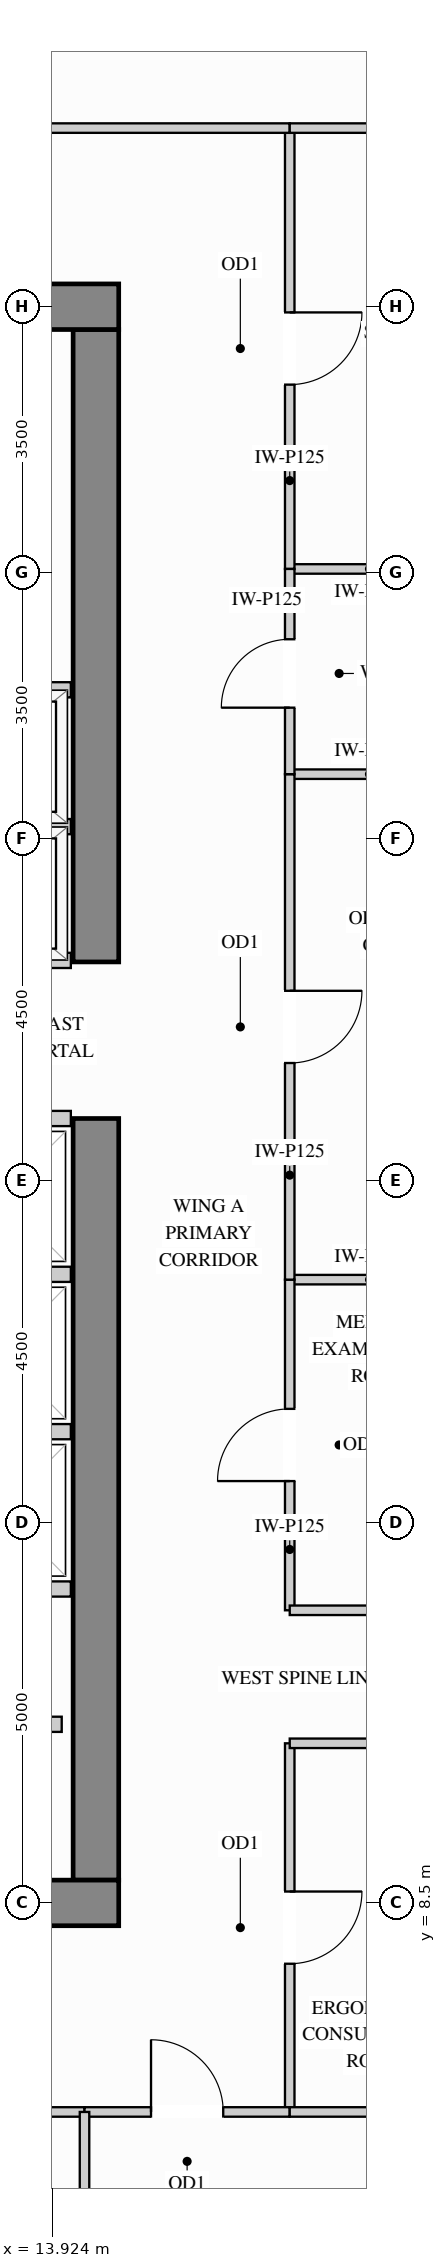
"""IFC4 building model, lengths in metres.
Left out: names, types, materials, properties, quantities, classifications, styles, units other than length and angle.
Written with IfcOpenShell. Run it as: python <this file> out.ifc"""

import sys

from ifc_helpers import new_model, si_unit, direction, frame, frame_2d, origin, place, context, subcontext, project, spatial, rectangle, extrude, source, transform, mapped, element, fill, save


model = new_model("IFC4")
c1 = context("Model", 3, precision=1e-05, world=origin(), true_north=direction((0.0, 1.0)))
c2 = subcontext(c1, "Body", "Model", "MODEL_VIEW")
j1 = project(units=[si_unit("LENGTHUNIT", "METRE"), si_unit("PLANEANGLEUNIT", "RADIAN")], contexts=[c1])
p1 = place(None, origin())
s1 = spatial("IfcSite", under=j1, at=p1, CompositionType="ELEMENT")
p2 = place(p1, origin())
s2 = spatial("IfcBuilding", under=s1, at=p2, CompositionType="ELEMENT")
p3 = place(p2, frame((0.0, 0.0, 157.5)))
s3 = spatial("IfcBuildingStorey", under=s2, at=p3, CompositionType="ELEMENT", Elevation=157.5)
m1 = source(origin(), c2, "Body", "SweptSolid", [
    extrude(rectangle(XDim=10.02, YDim=0.6, at=frame_2d((5.01, 0.0))), origin(), (0.0, 0.0, 1.0), 3.4),
])
p4 = place(p3, frame((14.5, 8.8, 0.0), z_axis=(0.0, 0.0, 1.0), x_axis=(0.0, 1.0, 0.0)))
e1 = element("IfcWall", 1, at=p4, inside=s3, PredefinedType="SHEAR", context=c2, shape_type="MappedRepresentation", body=[
    mapped(m1, transform((0.0, 0.0, 0.0), x_axis=(1.0, 0.0, 0.0), y_axis=(0.0, 1.0, 0.0), z_axis=(0.0, 0.0, 1.0))),
])
m2 = source(origin(), c2, "Body", "SweptSolid", [
    extrude(rectangle(XDim=8.32, YDim=0.6, at=frame_2d((4.16, 0.0))), origin(), (0.0, 0.0, 1.0), 3.4),
])
p5 = place(p3, frame((14.5, 20.88, 0.0), z_axis=(0.0, 0.0, 1.0), x_axis=(0.0, 1.0, 0.0)))
e2 = element("IfcWall", 2, at=p5, inside=s3, PredefinedType="SHEAR", context=c2, shape_type="MappedRepresentation", body=[
    mapped(m2, transform((0.0, 0.0, 0.0), x_axis=(1.0, 0.0, 0.0), y_axis=(0.0, 1.0, 0.0), z_axis=(0.0, 0.0, 1.0))),
])
m3 = source(origin(), c2, "Body", "SweptSolid", [
    extrude(rectangle(XDim=10.6, YDim=0.6, at=frame_2d((5.3, 0.0))), origin(), (0.0, 0.0, 1.0), 3.4),
])
for number, where, z_axis, x_axis in (
    (3, (4.2, 29.5, 0.0), (0.0, 0.0, 1.0), (1.0, 0.0, 0.0)),
    (4, (4.2, 8.5, 0.0), (0.0, 0.0, 1.0), (1.0, 0.0, 0.0)),
):
    element("IfcWall", number, at=place(p3, frame(where, z_axis=z_axis, x_axis=x_axis)), inside=s3, PredefinedType="SHEAR", context=c2, shape_type="MappedRepresentation", body=[
        mapped(m3, transform((0.0, 0.0, 0.0), x_axis=(1.0, 0.0, 0.0), y_axis=(0.0, 1.0, 0.0), z_axis=(0.0, 0.0, 1.0))),
    ])
m4 = source(origin(), c2, "Body", "SweptSolid", [
    extrude(rectangle(XDim=2.1, YDim=0.125, at=frame_2d((1.05, 0.0))), origin(), (0.0, 0.0, 1.0), 2.916),
])
p6 = place(p3, frame((17.05, 16.7, 0.0), z_axis=(0.0, 0.0, 1.0), x_axis=(1.0, 0.0, 0.0)))
e5 = element("IfcWall", 5, at=p6, inside=s3, PredefinedType="PARTITIONING", context=c2, shape_type="MappedRepresentation", body=[
    mapped(m4, transform((0.0, 0.0, 0.0), x_axis=(1.0, 0.0, 0.0), y_axis=(0.0, 1.0, 0.0), z_axis=(0.0, 0.0, 1.0))),
])
m5 = source(origin(), c2, "Body", "SweptSolid", [
    extrude(rectangle(XDim=2.098, YDim=0.125, at=frame_2d((1.049, 0.0))), origin(), (0.0, 0.0, 1.0), 3.385),
])
for number, where, z_axis, x_axis in (
    (6, (17.05, 23.35, 0.0), (0.0, 0.0, 1.0), (1.0, 0.0, 0.0)),
    (7, (17.05, 26.05, 0.0), (0.0, 0.0, 1.0), (1.0, 0.0, 0.0)),
):
    element("IfcWall", number, at=place(p3, frame(where, z_axis=z_axis, x_axis=x_axis)), inside=s3, PredefinedType="PARTITIONING", context=c2, shape_type="MappedRepresentation", body=[
        mapped(m5, transform((0.0, 0.0, 0.0), x_axis=(1.0, 0.0, 0.0), y_axis=(0.0, 1.0, 0.0), z_axis=(0.0, 0.0, 1.0))),
    ])
p7 = place(p3, frame((17.05, 12.35, 0.0), z_axis=(0.0, 0.0, 1.0), x_axis=(0.0, 1.0, 0.0)))
e8 = element("IfcWall", 8, at=p7, inside=s3, PredefinedType="PARTITIONING", context=c2, shape_type="SweptSolid", body=[
    extrude(rectangle(XDim=4.35, YDim=0.125, at=frame_2d((2.175, 0.0))), origin(), (0.0, 0.0, 1.0), 3.385),
])
p8 = place(p7, frame((1.7, 0.0, 0.0)))
e9 = element("IfcOpeningElement", 9, at=p8, cuts=e8, PredefinedType="OPENING", context=c2, shape_type="SweptSolid", body=[
    extrude(rectangle(XDim=0.95, YDim=2.15, at=frame_2d((0.475, 1.075))), frame((0.0, 0.073, 0.0), z_axis=(0.0, -1.0, 0.0), x_axis=(1.0, 0.0, 0.0)), (0.0, 0.0, 1.0), 0.145),
])
p9 = place(p3, frame((17.05, 16.7, 0.0), z_axis=(0.0, 0.0, 1.0), x_axis=(0.0, 1.0, 0.0)))
e10 = element("IfcWall", 10, at=p9, inside=s3, PredefinedType="PARTITIONING", context=c2, shape_type="SweptSolid", body=[
    extrude(rectangle(XDim=6.65, YDim=0.125, at=frame_2d((3.325, 0.0))), origin(), (0.0, 0.0, 1.0), 3.385),
])
p10 = place(p9, frame((2.85, 0.0, 0.0)))
e11 = element("IfcOpeningElement", 11, at=p10, cuts=e10, PredefinedType="OPENING", context=c2, shape_type="SweptSolid", body=[
    extrude(rectangle(XDim=0.95, YDim=2.15, at=frame_2d((0.475, 1.075))), frame((0.0, 0.073, 0.0), z_axis=(0.0, -1.0, 0.0), x_axis=(1.0, 0.0, 0.0)), (0.0, 0.0, 1.0), 0.145),
])
p11 = place(p3, frame((17.05, 26.05, 0.0), z_axis=(0.0, 0.0, 1.0), x_axis=(0.0, 1.0, 0.0)))
e12 = element("IfcWall", 12, at=p11, inside=s3, PredefinedType="PARTITIONING", context=c2, shape_type="SweptSolid", body=[
    extrude(rectangle(XDim=5.8, YDim=0.125, at=frame_2d((2.9, 0.0))), origin(), (0.0, 0.0, 1.0), 3.385),
])
p12 = place(p11, frame((2.425, 0.0, 0.0)))
e13 = element("IfcOpeningElement", 13, at=p12, cuts=e12, PredefinedType="OPENING", context=c2, shape_type="SweptSolid", body=[
    extrude(rectangle(XDim=0.95, YDim=2.15, at=frame_2d((0.475, 1.075))), frame((0.0, 0.073, 0.0), z_axis=(0.0, -1.0, 0.0), x_axis=(1.0, 0.0, 0.0)), (0.0, 0.0, 1.0), 0.145),
])
p13 = place(p3, frame((17.05, 5.75, 0.0), z_axis=(0.0, 0.0, 1.0), x_axis=(0.0, 1.0, 0.0)))
e14 = element("IfcWall", 14, at=p13, inside=s3, PredefinedType="PARTITIONING", context=c2, shape_type="SweptSolid", body=[
    extrude(rectangle(XDim=4.85, YDim=0.125, at=frame_2d((2.425, 0.0))), origin(), (0.0, 0.0, 1.0), 3.385),
])
p14 = place(p13, frame((1.95, 0.0, 0.0)))
e15 = element("IfcOpeningElement", 15, at=p14, cuts=e14, PredefinedType="OPENING", context=c2, shape_type="SweptSolid", body=[
    extrude(rectangle(XDim=0.95, YDim=2.15, at=frame_2d((0.475, 1.075))), frame((0.0, 0.073, 0.0), z_axis=(0.0, -1.0, 0.0), x_axis=(1.0, 0.0, 0.0)), (0.0, 0.0, 1.0), 0.145),
])
p15 = place(p3, frame((17.05, 23.35, 0.0), z_axis=(0.0, 0.0, 1.0), x_axis=(0.0, 1.0, 0.0)))
e16 = element("IfcWall", 16, at=p15, inside=s3, PredefinedType="PARTITIONING", context=c2, shape_type="SweptSolid", body=[
    extrude(rectangle(XDim=2.7, YDim=0.125, at=frame_2d((1.35, 0.0))), origin(), (0.0, 0.0, 1.0), 3.385),
])
p16 = place(p15, frame((0.875, 0.0, 0.0)))
e17 = element("IfcOpeningElement", 17, at=p16, cuts=e16, PredefinedType="OPENING", context=c2, shape_type="SweptSolid", body=[
    extrude(rectangle(XDim=0.9, YDim=2.15, at=frame_2d((0.45, 1.075))), frame((0.0, 0.073, 0.0), z_axis=(0.0, -1.0, 0.0), x_axis=(1.0, 0.0, 0.0)), (0.0, 0.0, 1.0), 0.145),
])
p17 = place(p3, frame((9.039, 31.85, 0.0), z_axis=(0.0, 0.0, 1.0), x_axis=(1.0, 0.0, 0.0)))
e18 = element("IfcWall", 18, at=p17, inside=s3, PredefinedType="PARTITIONING", context=c2, shape_type="SweptSolid", body=[
    extrude(rectangle(XDim=8.011, YDim=0.125, at=frame_2d((4.005, 0.0))), origin(), (0.0, 0.0, 1.0), 2.848),
])
p18 = place(p17, frame((3.531, 0.0, 0.0)))
e19 = element("IfcOpeningElement", 19, at=p18, cuts=e18, PredefinedType="OPENING", context=c2, shape_type="SweptSolid", body=[
    extrude(rectangle(XDim=0.95, YDim=2.15, at=frame_2d((0.475, 1.075))), frame((0.0, 0.073, 0.0), z_axis=(0.0, -1.0, 0.0), x_axis=(1.0, 0.0, 0.0)), (0.0, 0.0, 1.0), 0.145),
])
m6 = source(origin(), c2, "Body", "SweptSolid", [
    extrude(rectangle(XDim=2.098, YDim=0.125, at=frame_2d((1.049, 0.0))), origin(), (0.0, 0.0, 1.0), 2.848),
])
p19 = place(p3, frame((17.05, 31.85, 0.0), z_axis=(0.0, 0.0, 1.0), x_axis=(1.0, 0.0, 0.0)))
e20 = element("IfcWall", 20, at=p19, inside=s3, PredefinedType="PARTITIONING", context=c2, shape_type="MappedRepresentation", body=[
    mapped(m6, transform((0.0, 0.0, 0.0), x_axis=(1.0, 0.0, 0.0), y_axis=(0.0, 1.0, 0.0), z_axis=(0.0, 0.0, 1.0))),
])
m7 = source(origin(), c2, "Body", "SweptSolid", [
    extrude(rectangle(XDim=2.45, YDim=0.125, at=frame_2d((1.225, 0.0))), origin(), (0.0, 0.0, 1.0), 3.385),
])
for number, where, z_axis, x_axis in (
    (21, (17.05, 12.35, 0.0), (0.0, 0.0, 1.0), (1.0, 0.0, 0.0)),
    (22, (17.05, 10.6, 0.0), (0.0, 0.0, 1.0), (1.0, 0.0, 0.0)),
):
    element("IfcWall", number, at=place(p3, frame(where, z_axis=z_axis, x_axis=x_axis)), inside=s3, PredefinedType="PARTITIONING", context=c2, shape_type="MappedRepresentation", body=[
        mapped(m7, transform((0.0, 0.0, 0.0), x_axis=(1.0, 0.0, 0.0), y_axis=(0.0, 1.0, 0.0), z_axis=(0.0, 0.0, 1.0))),
    ])
p20 = place(p3, frame((8.558, 5.75, 0.0), z_axis=(0.0, 0.0, 1.0), x_axis=(1.0, 0.0, 0.0)))
e23 = element("IfcWall", 23, at=p20, inside=s3, PredefinedType="PARTITIONING", context=c2, shape_type="SweptSolid", body=[
    extrude(rectangle(XDim=5.792, YDim=0.125, at=frame_2d((2.896, 0.0))), origin(), (0.0, 0.0, 1.0), 3.385),
])
p21 = place(p20, frame((2.421, 0.0, 0.0)))
e24 = element("IfcOpeningElement", 24, at=p21, cuts=e23, PredefinedType="OPENING", context=c2, shape_type="SweptSolid", body=[
    extrude(rectangle(XDim=0.95, YDim=2.15, at=frame_2d((0.475, 1.075))), frame((0.0, 0.073, 0.0), z_axis=(0.0, -1.0, 0.0), x_axis=(1.0, 0.0, 0.0)), (0.0, 0.0, 1.0), 0.145),
])
p22 = place(p3, frame((14.35, 5.75, 0.0), z_axis=(0.0, 0.0, 1.0), x_axis=(1.0, 0.0, 0.0)))
e25 = element("IfcWall", 25, at=p22, inside=s3, PredefinedType="PARTITIONING", context=c2, shape_type="SweptSolid", body=[
    extrude(rectangle(XDim=2.7, YDim=0.125, at=frame_2d((1.35, 0.0))), origin(), (0.0, 0.0, 1.0), 3.385),
])
p23 = place(p22, frame((0.875, 0.0, 0.0)))
e26 = element("IfcOpeningElement", 26, at=p23, cuts=e25, PredefinedType="OPENING", context=c2, shape_type="SweptSolid", body=[
    extrude(rectangle(XDim=0.95, YDim=2.15, at=frame_2d((0.475, 1.075))), frame((0.0, 0.073, 0.0), z_axis=(0.0, -1.0, 0.0), x_axis=(1.0, 0.0, 0.0)), (0.0, 0.0, 1.0), 0.145),
])
p24 = place(p3, frame((17.05, 5.75, 0.0), z_axis=(0.0, 0.0, 1.0), x_axis=(1.0, 0.0, 0.0)))
e27 = element("IfcWall", 27, at=p24, inside=s3, PredefinedType="PARTITIONING", context=c2, shape_type="MappedRepresentation", body=[
    mapped(m5, transform((0.0, 0.0, 0.0), x_axis=(1.0, 0.0, 0.0), y_axis=(0.0, 1.0, 0.0), z_axis=(0.0, 0.0, 1.0))),
])
m8 = source(origin(), c2, "Body", "SweptSolid", [
    extrude(rectangle(XDim=4.63, YDim=0.125, at=frame_2d((2.315, 0.0))), origin(), (0.0, 0.0, 1.0), 3.385),
])
p25 = place(p3, frame((14.35, 1.12, 0.0), z_axis=(0.0, 0.0, 1.0), x_axis=(0.0, 1.0, 0.0)))
e28 = element("IfcWall", 28, at=p25, inside=s3, PredefinedType="PARTITIONING", context=c2, shape_type="MappedRepresentation", body=[
    mapped(m8, transform((0.0, 0.0, 0.0), x_axis=(1.0, 0.0, 0.0), y_axis=(0.0, 1.0, 0.0), z_axis=(0.0, 0.0, 1.0))),
])
m9 = source(origin(), c2, "Body", "SweptSolid", [
    extrude(rectangle(XDim=1.63, YDim=0.2, at=frame_2d((0.815, 0.0))), origin(), (0.0, 0.0, 1.0), 3.385),
])
p26 = place(p3, frame((12.42, 10.85, 0.0), z_axis=(0.0, 0.0, 1.0), x_axis=(1.0, 0.0, 0.0)))
e29 = element("IfcWall", 29, at=p26, inside=s3, PredefinedType="PARTITIONING", context=c2, shape_type="MappedRepresentation", body=[
    mapped(m9, transform((0.0, 0.0, 0.0), x_axis=(1.0, 0.0, 0.0), y_axis=(0.0, 1.0, 0.0), z_axis=(0.0, 0.0, 1.0))),
])
m10 = source(origin(), c2, "Body", "SweptSolid", [
    extrude(rectangle(XDim=2.34, YDim=0.2, at=frame_2d((1.17, 0.0))), origin(), (0.0, 0.0, 1.0), 3.385),
])
for number, where, z_axis, x_axis in (
    (30, (11.83, 22.66, 0.0), (0.0, 0.0, 1.0), (1.0, 0.0, 0.0)),
    (31, (11.83, 20.9, 0.0), (0.0, 0.0, 1.0), (1.0, 0.0, 0.0)),
    (32, (11.83, 24.46, 0.0), (0.0, 0.0, 1.0), (1.0, 0.0, 0.0)),
):
    element("IfcWall", number, at=place(p3, frame(where, z_axis=z_axis, x_axis=x_axis)), inside=s3, PredefinedType="PARTITIONING", context=c2, shape_type="MappedRepresentation", body=[
        mapped(m10, transform((0.0, 0.0, 0.0), x_axis=(1.0, 0.0, 0.0), y_axis=(0.0, 1.0, 0.0), z_axis=(0.0, 0.0, 1.0))),
    ])
m11 = source(origin(), c2, "Body", "SweptSolid", [
    extrude(rectangle(XDim=1.94, YDim=0.2, at=frame_2d((0.97, 0.0))), origin(), (0.0, 0.0, 1.0), 3.385),
])
for number, where, z_axis, x_axis in (
    (33, (12.23, 14.7, 0.0), (0.0, 0.0, 1.0), (1.0, 0.0, 0.0)),
    (34, (12.23, 12.63, 0.0), (0.0, 0.0, 1.0), (1.0, 0.0, 0.0)),
    (35, (12.23, 16.77, 0.0), (0.0, 0.0, 1.0), (1.0, 0.0, 0.0)),
    (36, (12.23, 18.82, 0.0), (0.0, 0.0, 1.0), (1.0, 0.0, 0.0)),
):
    element("IfcWall", number, at=place(p3, frame(where, z_axis=z_axis, x_axis=x_axis)), inside=s3, PredefinedType="PARTITIONING", context=c2, shape_type="MappedRepresentation", body=[
        mapped(m11, transform((0.0, 0.0, 0.0), x_axis=(1.0, 0.0, 0.0), y_axis=(0.0, 1.0, 0.0), z_axis=(0.0, 0.0, 1.0))),
    ])
m12 = source(origin(), c2, "Body", "SweptSolid", [
    extrude(rectangle(XDim=0.95, YDim=2.15, at=frame_2d((0.475, 1.075))), frame((0.0, 0.025, 0.0), z_axis=(0.0, -1.0, 0.0), x_axis=(1.0, 0.0, 0.0)), (0.0, 0.0, 1.0), 0.05),
])
p27 = place(p14, origin())
e37 = element("IfcDoor", 37, at=p27, inside=s3, OperationType="SINGLE_SWING_RIGHT", PredefinedType="DOOR", context=c2, shape_type="MappedRepresentation", body=[
    mapped(m12, transform((0.0, 0.0, 0.0), x_axis=(1.0, 0.0, 0.0), y_axis=(0.0, 1.0, 0.0), z_axis=(0.0, 0.0, 1.0))),
])
fill(e15, e37)
p28 = place(p8, origin())
e38 = element("IfcDoor", 38, at=p28, inside=s3, OperationType="SINGLE_SWING_LEFT", PredefinedType="DOOR", context=c2, shape_type="MappedRepresentation", body=[
    mapped(m12, transform((0.0, 0.0, 0.0), x_axis=(1.0, 0.0, 0.0), y_axis=(0.0, 1.0, 0.0), z_axis=(0.0, 0.0, 1.0))),
])
fill(e9, e38)
p29 = place(p10, origin())
e39 = element("IfcDoor", 39, at=p29, inside=s3, OperationType="SINGLE_SWING_RIGHT", PredefinedType="DOOR", context=c2, shape_type="MappedRepresentation", body=[
    mapped(m12, transform((0.0, 0.0, 0.0), x_axis=(1.0, 0.0, 0.0), y_axis=(0.0, 1.0, 0.0), z_axis=(0.0, 0.0, 1.0))),
])
fill(e11, e39)
p30 = place(p12, origin())
e40 = element("IfcDoor", 40, at=p30, inside=s3, OperationType="SINGLE_SWING_RIGHT", PredefinedType="DOOR", context=c2, shape_type="MappedRepresentation", body=[
    mapped(m12, transform((0.0, 0.0, 0.0), x_axis=(1.0, 0.0, 0.0), y_axis=(0.0, 1.0, 0.0), z_axis=(0.0, 0.0, 1.0))),
])
fill(e13, e40)
p31 = place(p23, origin())
e41 = element("IfcDoor", 41, at=p31, inside=s3, OperationType="SINGLE_SWING_LEFT", PredefinedType="DOOR", context=c2, shape_type="MappedRepresentation", body=[
    mapped(m12, transform((0.0, 0.0, 0.0), x_axis=(1.0, 0.0, 0.0), y_axis=(0.0, 1.0, 0.0), z_axis=(0.0, 0.0, 1.0))),
])
fill(e26, e41)
m13 = source(origin(), c2, "Body", "SweptSolid", [
    extrude(rectangle(XDim=0.9, YDim=2.15, at=frame_2d((0.45, 1.075))), frame((0.0, 0.025, 0.0), z_axis=(0.0, -1.0, 0.0), x_axis=(1.0, 0.0, 0.0)), (0.0, 0.0, 1.0), 0.05),
])
p32 = place(p16, origin())
e42 = element("IfcDoor", 42, at=p32, inside=s3, OperationType="SINGLE_SWING_LEFT", PredefinedType="DOOR", context=c2, shape_type="MappedRepresentation", body=[
    mapped(m13, transform((0.0, 0.0, 0.0), x_axis=(1.0, 0.0, 0.0), y_axis=(0.0, 1.0, 0.0), z_axis=(0.0, 0.0, 1.0))),
])
fill(e17, e42)
save(model, sys.argv[1])
